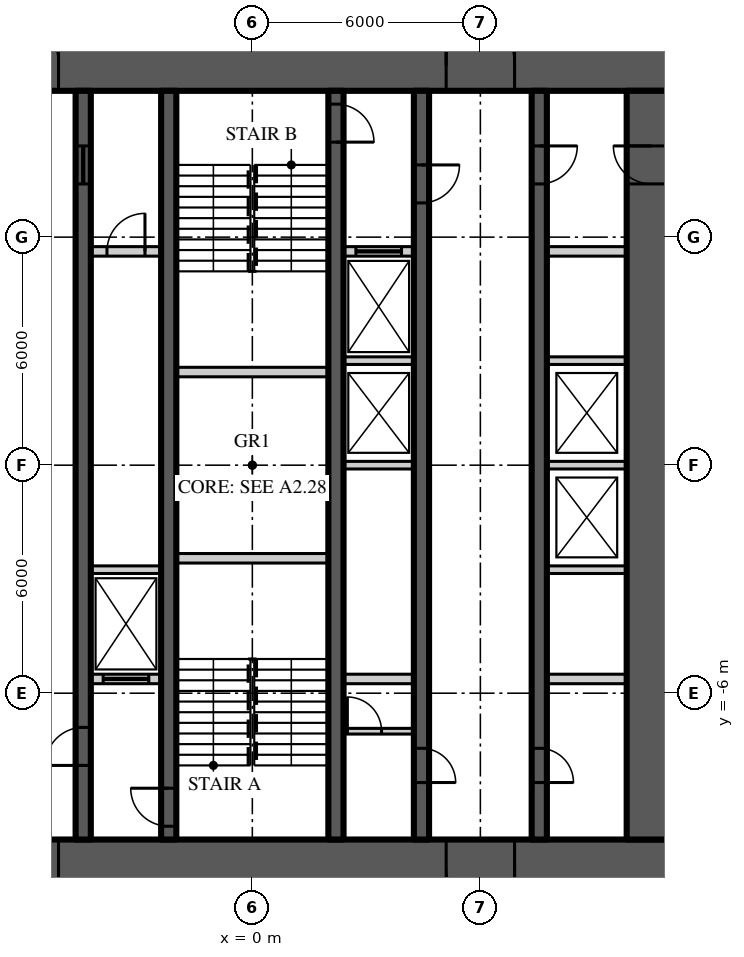
"""IFC4 building model, lengths in metres.
Left out: names, types, materials, properties, quantities, classifications, styles, units other than length and angle.
Written with IfcOpenShell. Run it as: python <this file> out.ifc"""

import sys

from ifc_helpers import new_model, si_unit, direction, frame, frame_2d, origin, place, context, subcontext, project, spatial, rectangle, extrude, element, fill, save


model = new_model("IFC4")
c1 = context("Model", 3, precision=1e-05, world=origin(), true_north=direction((0.0, 1.0)))
c2 = subcontext(c1, "Body", "Model", "MODEL_VIEW")
j1 = project(units=[si_unit("LENGTHUNIT", "METRE"), si_unit("PLANEANGLEUNIT", "RADIAN")], contexts=[c1])
p1 = place(None, origin())
s1 = spatial("IfcSite", under=j1, at=p1, CompositionType="ELEMENT")
p2 = place(p1, origin())
s2 = spatial("IfcBuilding", under=s1, at=p2, CompositionType="ELEMENT")
p3 = place(p2, frame((0.0, 0.0, 204.9)))
s3 = spatial("IfcBuildingStorey", under=s2, at=p3, CompositionType="ELEMENT", Elevation=204.9)
p4 = place(p3, frame((-11.15, 10.5, 0.0), z_axis=(0.0, 0.0, 1.0), x_axis=(1.0, 0.0, 0.0)))
e1 = element("IfcWall", 1, at=p4, inside=s3, PredefinedType="SHEAR", context=c2, shape_type="SweptSolid", body=[
    extrude(rectangle(XDim=22.3, YDim=1.3, at=frame_2d((11.15, 0.0))), origin(), (0.0, 0.0, 1.0), 3.9),
])
p5 = place(p4, frame((4.25, 0.0, 0.0)))
e2 = element("IfcOpeningElement", 2, at=p5, cuts=e1, PredefinedType="OPENING", context=c2, shape_type="SweptSolid", body=[
    extrude(rectangle(XDim=1.8, YDim=2.2, at=frame_2d((0.9, 1.1))), frame((0.0, 0.66, 0.0), z_axis=(0.0, -1.0, 0.0), x_axis=(1.0, 0.0, 0.0)), (0.0, 0.0, 1.0), 1.32),
])
p6 = place(p4, frame((16.25, 0.0, 0.0)))
e3 = element("IfcOpeningElement", 3, at=p6, cuts=e1, PredefinedType="OPENING", context=c2, shape_type="SweptSolid", body=[
    extrude(rectangle(XDim=1.8, YDim=2.2, at=frame_2d((0.9, 1.1))), frame((0.0, 0.66, 0.0), z_axis=(0.0, -1.0, 0.0), x_axis=(1.0, 0.0, 0.0)), (0.0, 0.0, 1.0), 1.32),
])
p7 = place(p3, frame((11.15, -10.5, 0.0), z_axis=(0.0, 0.0, 1.0), x_axis=(-1.0, 0.0, 0.0)))
e4 = element("IfcWall", 4, at=p7, inside=s3, PredefinedType="SHEAR", context=c2, shape_type="SweptSolid", body=[
    extrude(rectangle(XDim=22.3, YDim=1.3, at=frame_2d((11.15, 0.0))), origin(), (0.0, 0.0, 1.0), 3.9),
])
p8 = place(p7, frame((16.25, 0.0, 0.0)))
e5 = element("IfcOpeningElement", 5, at=p8, cuts=e4, PredefinedType="OPENING", context=c2, shape_type="SweptSolid", body=[
    extrude(rectangle(XDim=1.8, YDim=2.2, at=frame_2d((0.9, 1.1))), frame((0.0, 0.66, 0.0), z_axis=(0.0, -1.0, 0.0), x_axis=(1.0, 0.0, 0.0)), (0.0, 0.0, 1.0), 1.32),
])
p9 = place(p7, frame((4.25, 0.0, 0.0)))
e6 = element("IfcOpeningElement", 6, at=p9, cuts=e4, PredefinedType="OPENING", context=c2, shape_type="SweptSolid", body=[
    extrude(rectangle(XDim=1.8, YDim=2.2, at=frame_2d((0.9, 1.1))), frame((0.0, 0.66, 0.0), z_axis=(0.0, -1.0, 0.0), x_axis=(1.0, 0.0, 0.0)), (0.0, 0.0, 1.0), 1.32),
])
p10 = place(p3, frame((10.5, -9.85, 0.0), z_axis=(0.0, 0.0, 1.0), x_axis=(0.0, 1.0, 0.0)))
e7 = element("IfcWall", 7, at=p10, inside=s3, PredefinedType="SHEAR", context=c2, shape_type="SweptSolid", body=[
    extrude(rectangle(XDim=19.7, YDim=1.3, at=frame_2d((9.85, 0.0))), origin(), (0.0, 0.0, 1.0), 3.9),
])
p11 = place(p10, frame((17.25, 0.0, 0.0)))
e8 = element("IfcOpeningElement", 8, at=p11, cuts=e7, PredefinedType="OPENING", context=c2, shape_type="SweptSolid", body=[
    extrude(rectangle(XDim=1.0, YDim=2.2, at=frame_2d((0.5, 1.1))), frame((0.0, 0.66, 0.0), z_axis=(0.0, -1.0, 0.0), x_axis=(1.0, 0.0, 0.0)), (0.0, 0.0, 1.0), 1.32),
])
p12 = place(p3, frame((7.55, 9.85, 0.0), z_axis=(0.0, 0.0, 1.0), x_axis=(0.0, -1.0, 0.0)))
e9 = element("IfcWall", 9, at=p12, inside=s3, PredefinedType="SHEAR", context=c2, shape_type="SweptSolid", body=[
    extrude(rectangle(XDim=19.7, YDim=0.4, at=frame_2d((9.85, 0.0))), origin(), (0.0, 0.0, 1.0), 3.9),
])
p13 = place(p12, frame((1.45, 0.0, 0.0)))
e10 = element("IfcOpeningElement", 10, at=p13, cuts=e9, PredefinedType="OPENING", context=c2, shape_type="SweptSolid", body=[
    extrude(rectangle(XDim=1.0, YDim=2.2, at=frame_2d((0.5, 1.1))), frame((0.0, 0.21, 0.0), z_axis=(0.0, -1.0, 0.0), x_axis=(1.0, 0.0, 0.0)), (0.0, 0.0, 1.0), 0.42),
])
p14 = place(p12, frame((17.3, 0.0, 0.0)))
e11 = element("IfcOpeningElement", 11, at=p14, cuts=e9, PredefinedType="OPENING", context=c2, shape_type="SweptSolid", body=[
    extrude(rectangle(XDim=0.9, YDim=2.1, at=frame_2d((0.45, 1.05))), frame((0.0, 0.21, 0.0), z_axis=(0.0, -1.0, 0.0), x_axis=(1.0, 0.0, 0.0)), (0.0, 0.0, 1.0), 0.42),
])
p15 = place(p3, frame((-4.45, -9.85, 0.0), z_axis=(0.0, 0.0, 1.0), x_axis=(0.0, 1.0, 0.0)))
e12 = element("IfcWall", 12, at=p15, inside=s3, PredefinedType="SHEAR", context=c2, shape_type="SweptSolid", body=[
    extrude(rectangle(XDim=19.7, YDim=0.4, at=frame_2d((9.85, 0.0))), origin(), (0.0, 0.0, 1.0), 3.9),
])
p16 = place(p15, frame((1.95, 0.0, 0.0)))
e13 = element("IfcOpeningElement", 13, at=p16, cuts=e12, PredefinedType="OPENING", context=c2, shape_type="SweptSolid", body=[
    extrude(rectangle(XDim=1.0, YDim=2.2, at=frame_2d((0.5, 1.1))), frame((0.0, 0.21, 0.0), z_axis=(0.0, -1.0, 0.0), x_axis=(1.0, 0.0, 0.0)), (0.0, 0.0, 1.0), 0.42),
])
p17 = place(p15, frame((17.25, 0.0, 0.0)))
e14 = element("IfcOpeningElement", 14, at=p17, cuts=e12, PredefinedType="OPENING", context=c2, shape_type="SweptSolid", body=[
    extrude(rectangle(XDim=1.0, YDim=2.1, at=frame_2d((0.5, 1.05))), frame((0.0, 0.21, 0.0), z_axis=(0.0, -1.0, 0.0), x_axis=(1.0, 0.0, 0.0)), (0.0, 0.0, 1.0), 0.42),
])
p18 = place(p3, frame((4.45, 9.85, 0.0), z_axis=(0.0, 0.0, 1.0), x_axis=(0.0, -1.0, 0.0)))
e15 = element("IfcWall", 15, at=p18, inside=s3, PredefinedType="SHEAR", context=c2, shape_type="SweptSolid", body=[
    extrude(rectangle(XDim=19.7, YDim=0.4, at=frame_2d((9.85, 0.0))), origin(), (0.0, 0.0, 1.0), 3.9),
])
p19 = place(p18, frame((1.95, 0.0, 0.0)))
e16 = element("IfcOpeningElement", 16, at=p19, cuts=e15, PredefinedType="OPENING", context=c2, shape_type="SweptSolid", body=[
    extrude(rectangle(XDim=1.0, YDim=2.2, at=frame_2d((0.5, 1.1))), frame((0.0, 0.21, 0.0), z_axis=(0.0, -1.0, 0.0), x_axis=(1.0, 0.0, 0.0)), (0.0, 0.0, 1.0), 0.42),
])
p20 = place(p18, frame((17.3, 0.0, 0.0)))
e17 = element("IfcOpeningElement", 17, at=p20, cuts=e15, PredefinedType="OPENING", context=c2, shape_type="SweptSolid", body=[
    extrude(rectangle(XDim=0.9, YDim=2.1, at=frame_2d((0.45, 1.05))), frame((0.0, 0.21, 0.0), z_axis=(0.0, -1.0, 0.0), x_axis=(1.0, 0.0, 0.0)), (0.0, 0.0, 1.0), 0.42),
])
p21 = place(p3, frame((-2.2, -9.85, 0.0), z_axis=(0.0, 0.0, 1.0), x_axis=(0.0, 1.0, 0.0)))
e18 = element("IfcWall", 18, at=p21, inside=s3, PredefinedType="SHEAR", context=c2, shape_type="SweptSolid", body=[
    extrude(rectangle(XDim=19.7, YDim=0.4, at=frame_2d((9.85, 0.0))), origin(), (0.0, 0.0, 1.0), 3.9),
])
p22 = place(p21, frame((0.35, 0.0, 0.0)))
e19 = element("IfcOpeningElement", 19, at=p22, cuts=e18, PredefinedType="OPENING", context=c2, shape_type="SweptSolid", body=[
    extrude(rectangle(XDim=1.0, YDim=2.2, at=frame_2d((0.5, 1.1))), frame((0.0, 0.21, 0.0), z_axis=(0.0, -1.0, 0.0), x_axis=(1.0, 0.0, 0.0)), (0.0, 0.0, 1.0), 0.42),
])
p23 = place(p3, frame((2.2, 9.85, 0.0), z_axis=(0.0, 0.0, 1.0), x_axis=(0.0, -1.0, 0.0)))
e20 = element("IfcWall", 20, at=p23, inside=s3, PredefinedType="SHEAR", context=c2, shape_type="SweptSolid", body=[
    extrude(rectangle(XDim=19.7, YDim=0.4, at=frame_2d((9.85, 0.0))), origin(), (0.0, 0.0, 1.0), 3.9),
])
p24 = place(p23, frame((0.35, 0.0, 0.0)))
e21 = element("IfcOpeningElement", 21, at=p24, cuts=e20, PredefinedType="OPENING", context=c2, shape_type="SweptSolid", body=[
    extrude(rectangle(XDim=1.0, YDim=2.2, at=frame_2d((0.5, 1.1))), frame((0.0, 0.21, 0.0), z_axis=(0.0, -1.0, 0.0), x_axis=(1.0, 0.0, 0.0)), (0.0, 0.0, 1.0), 0.42),
])
p25 = place(p3, frame((-4.25, 5.625, 0.0), z_axis=(0.0, 0.0, 1.0), x_axis=(1.0, 0.0, 0.0)))
e22 = element("IfcWall", 22, at=p25, inside=s3, PredefinedType="SOLIDWALL", context=c2, shape_type="SweptSolid", body=[
    extrude(rectangle(XDim=1.85, YDim=0.25, at=frame_2d((0.925, 0.0))), origin(), (0.0, 0.0, 1.0), 3.7),
])
p26 = place(p25, frame((0.425, 0.0, 0.0)))
e23 = element("IfcOpeningElement", 23, at=p26, cuts=e22, PredefinedType="OPENING", context=c2, shape_type="SweptSolid", body=[
    extrude(rectangle(XDim=1.0, YDim=2.2, at=frame_2d((0.5, 1.1))), frame((0.0, 0.135, 0.0), z_axis=(0.0, -1.0, 0.0), x_axis=(1.0, 0.0, 0.0)), (0.0, 0.0, 1.0), 0.27),
])
p27 = place(p3, frame((2.4, 5.625, 0.0), z_axis=(0.0, 0.0, 1.0), x_axis=(1.0, 0.0, 0.0)))
e24 = element("IfcWall", 24, at=p27, inside=s3, PredefinedType="SOLIDWALL", context=c2, shape_type="SweptSolid", body=[
    extrude(rectangle(XDim=1.85, YDim=0.25, at=frame_2d((0.925, 0.0))), origin(), (0.0, 0.0, 1.0), 3.7),
])
p28 = place(p27, frame((0.325, 0.0, 0.0)))
e25 = element("IfcOpeningElement", 25, at=p28, cuts=e24, PredefinedType="OPENING", context=c2, shape_type="SweptSolid", body=[
    extrude(rectangle(XDim=1.2, YDim=2.2, at=frame_2d((0.6, 1.1))), frame((0.0, 0.135, 0.0), z_axis=(0.0, -1.0, 0.0), x_axis=(1.0, 0.0, 0.0)), (0.0, 0.0, 1.0), 0.27),
])
p29 = place(p3, frame((7.75, 5.625, 0.0), z_axis=(0.0, 0.0, 1.0), x_axis=(1.0, 0.0, 0.0)))
e26 = element("IfcWall", 26, at=p29, inside=s3, PredefinedType="SOLIDWALL", context=c2, shape_type="SweptSolid", body=[
    extrude(rectangle(XDim=2.1, YDim=0.25, at=frame_2d((1.05, 0.0))), origin(), (0.0, 0.0, 1.0), 3.7),
])
p30 = place(p3, frame((-4.25, -5.625, 0.0), z_axis=(0.0, 0.0, 1.0), x_axis=(1.0, 0.0, 0.0)))
e27 = element("IfcWall", 27, at=p30, inside=s3, PredefinedType="SOLIDWALL", context=c2, shape_type="SweptSolid", body=[
    extrude(rectangle(XDim=1.85, YDim=0.25, at=frame_2d((0.925, 0.0))), origin(), (0.0, 0.0, 1.0), 3.7),
])
p31 = place(p30, frame((0.325, 0.0, 0.0)))
e28 = element("IfcOpeningElement", 28, at=p31, cuts=e27, PredefinedType="OPENING", context=c2, shape_type="SweptSolid", body=[
    extrude(rectangle(XDim=1.2, YDim=2.2, at=frame_2d((0.6, 1.1))), frame((0.0, 0.135, 0.0), z_axis=(0.0, -1.0, 0.0), x_axis=(1.0, 0.0, 0.0)), (0.0, 0.0, 1.0), 0.27),
])
p32 = place(p3, frame((2.4, -5.625, 0.0), z_axis=(0.0, 0.0, 1.0), x_axis=(1.0, 0.0, 0.0)))
e29 = element("IfcWall", 29, at=p32, inside=s3, PredefinedType="SOLIDWALL", context=c2, shape_type="SweptSolid", body=[
    extrude(rectangle(XDim=1.85, YDim=0.25, at=frame_2d((0.925, 0.0))), origin(), (0.0, 0.0, 1.0), 3.7),
])
p33 = place(p3, frame((7.75, -5.625, 0.0), z_axis=(0.0, 0.0, 1.0), x_axis=(1.0, 0.0, 0.0)))
e30 = element("IfcWall", 30, at=p33, inside=s3, PredefinedType="SOLIDWALL", context=c2, shape_type="SweptSolid", body=[
    extrude(rectangle(XDim=2.1, YDim=0.25, at=frame_2d((1.05, 0.0))), origin(), (0.0, 0.0, 1.0), 3.7),
])
for number, where, z_axis, x_axis in (
    (31, (-2.0, -2.45, 0.0), (0.0, 0.0, 1.0), (1.0, 0.0, 0.0)),
    (32, (-2.0, 2.45, 0.0), (0.0, 0.0, 1.0), (1.0, 0.0, 0.0)),
):
    element("IfcWall", number, at=place(p3, frame(where, z_axis=z_axis, x_axis=x_axis)), inside=s3, PredefinedType="SOLIDWALL", context=c2, shape_type="SweptSolid", body=[
        extrude(rectangle(XDim=4.0, YDim=0.25, at=frame_2d((2.0, 0.0))), origin(), (0.0, 0.0, 1.0), 3.7),
    ])
p34 = place(p3, frame((-4.25, -2.75, 0.0), z_axis=(0.0, 0.0, 1.0), x_axis=(1.0, 0.0, 0.0)))
e33 = element("IfcWall", 33, at=p34, inside=s3, PredefinedType="SOLIDWALL", context=c2, shape_type="SweptSolid", body=[
    extrude(rectangle(XDim=1.85, YDim=0.2, at=frame_2d((0.925, 0.0))), origin(), (0.0, 0.0, 1.0), 3.7),
])
p35 = place(p3, frame((7.75, -2.75, 0.0), z_axis=(0.0, 0.0, 1.0), x_axis=(1.0, 0.0, 0.0)))
e34 = element("IfcWall", 34, at=p35, inside=s3, PredefinedType="SOLIDWALL", context=c2, shape_type="SweptSolid", body=[
    extrude(rectangle(XDim=2.1, YDim=0.2, at=frame_2d((1.05, 0.0))), origin(), (0.0, 0.0, 1.0), 3.7),
])
p36 = place(p3, frame((2.4, 0.0, 0.0), z_axis=(0.0, 0.0, 1.0), x_axis=(1.0, 0.0, 0.0)))
e35 = element("IfcWall", 35, at=p36, inside=s3, PredefinedType="SOLIDWALL", context=c2, shape_type="SweptSolid", body=[
    extrude(rectangle(XDim=1.85, YDim=0.2, at=frame_2d((0.925, 0.0))), origin(), (0.0, 0.0, 1.0), 3.7),
])
p37 = place(p3, frame((7.75, 0.0, 0.0), z_axis=(0.0, 0.0, 1.0), x_axis=(1.0, 0.0, 0.0)))
e36 = element("IfcWall", 36, at=p37, inside=s3, PredefinedType="SOLIDWALL", context=c2, shape_type="SweptSolid", body=[
    extrude(rectangle(XDim=2.1, YDim=0.2, at=frame_2d((1.05, 0.0))), origin(), (0.0, 0.0, 1.0), 3.7),
])
p38 = place(p3, frame((2.4, 2.75, 0.0), z_axis=(0.0, 0.0, 1.0), x_axis=(1.0, 0.0, 0.0)))
e37 = element("IfcWall", 37, at=p38, inside=s3, PredefinedType="SOLIDWALL", context=c2, shape_type="SweptSolid", body=[
    extrude(rectangle(XDim=1.85, YDim=0.2, at=frame_2d((0.925, 0.0))), origin(), (0.0, 0.0, 1.0), 3.7),
])
p39 = place(p3, frame((7.75, 2.75, 0.0), z_axis=(0.0, 0.0, 1.0), x_axis=(1.0, 0.0, 0.0)))
e38 = element("IfcWall", 38, at=p39, inside=s3, PredefinedType="SOLIDWALL", context=c2, shape_type="SweptSolid", body=[
    extrude(rectangle(XDim=2.1, YDim=0.2, at=frame_2d((1.05, 0.0))), origin(), (0.0, 0.0, 1.0), 3.7),
])
p40 = place(p3, frame((2.4, -7.0, 0.0), z_axis=(0.0, 0.0, 1.0), x_axis=(1.0, 0.0, 0.0)))
e39 = element("IfcWall", 39, at=p40, inside=s3, PredefinedType="SOLIDWALL", context=c2, shape_type="SweptSolid", body=[
    extrude(rectangle(XDim=1.85, YDim=0.15, at=frame_2d((0.925, 0.0))), origin(), (0.0, 0.0, 1.0), 3.77),
])
p41 = place(p40, frame((0.1, 0.0, 0.0)))
e40 = element("IfcOpeningElement", 40, at=p41, cuts=e39, PredefinedType="OPENING", context=c2, shape_type="SweptSolid", body=[
    extrude(rectangle(XDim=0.9, YDim=2.1, at=frame_2d((0.45, 1.05))), frame((0.0, 0.085, 0.0), z_axis=(0.0, -1.0, 0.0), x_axis=(1.0, 0.0, 0.0)), (0.0, 0.0, 1.0), 0.17),
])
p42 = place(p5, origin())
e41 = element("IfcDoor", 41, at=p42, inside=s3, OperationType="DOUBLE_DOOR_DOUBLE_SWING", PredefinedType="DOOR", context=c2, shape_type="SweptSolid", body=[
    extrude(rectangle(XDim=1.8, YDim=2.2, at=frame_2d((0.9, 1.1))), frame((0.0, 0.025, 0.0), z_axis=(0.0, -1.0, 0.0), x_axis=(1.0, 0.0, 0.0)), (0.0, 0.0, 1.0), 0.05),
])
fill(e2, e41)
p43 = place(p8, origin())
e42 = element("IfcDoor", 42, at=p43, inside=s3, OperationType="DOUBLE_DOOR_DOUBLE_SWING", PredefinedType="DOOR", context=c2, shape_type="SweptSolid", body=[
    extrude(rectangle(XDim=1.8, YDim=2.2, at=frame_2d((0.9, 1.1))), frame((0.0, 0.025, 0.0), z_axis=(0.0, -1.0, 0.0), x_axis=(1.0, 0.0, 0.0)), (0.0, 0.0, 1.0), 0.05),
])
fill(e5, e42)
p44 = place(p6, origin())
e43 = element("IfcDoor", 43, at=p44, inside=s3, OperationType="DOUBLE_DOOR_DOUBLE_SWING", PredefinedType="DOOR", context=c2, shape_type="SweptSolid", body=[
    extrude(rectangle(XDim=1.8, YDim=2.2, at=frame_2d((0.9, 1.1))), frame((0.0, 0.025, 0.0), z_axis=(0.0, -1.0, 0.0), x_axis=(1.0, 0.0, 0.0)), (0.0, 0.0, 1.0), 0.05),
])
fill(e3, e43)
p45 = place(p9, origin())
e44 = element("IfcDoor", 44, at=p45, inside=s3, OperationType="DOUBLE_DOOR_DOUBLE_SWING", PredefinedType="DOOR", context=c2, shape_type="SweptSolid", body=[
    extrude(rectangle(XDim=1.8, YDim=2.2, at=frame_2d((0.9, 1.1))), frame((0.0, 0.025, 0.0), z_axis=(0.0, -1.0, 0.0), x_axis=(1.0, 0.0, 0.0)), (0.0, 0.0, 1.0), 0.05),
])
fill(e6, e44)
p46 = place(p13, origin())
e45 = element("IfcDoor", 45, at=p46, inside=s3, OperationType="SINGLE_SWING_LEFT", PredefinedType="DOOR", context=c2, shape_type="SweptSolid", body=[
    extrude(rectangle(XDim=1.0, YDim=2.2, at=frame_2d((0.5, 1.1))), frame((0.0, 0.025, 0.0), z_axis=(0.0, -1.0, 0.0), x_axis=(1.0, 0.0, 0.0)), (0.0, 0.0, 1.0), 0.05),
])
fill(e10, e45)
p47 = place(p11, origin())
e46 = element("IfcDoor", 46, at=p47, inside=s3, OperationType="SINGLE_SWING_RIGHT", PredefinedType="DOOR", context=c2, shape_type="SweptSolid", body=[
    extrude(rectangle(XDim=1.0, YDim=2.2, at=frame_2d((0.5, 1.1))), frame((0.0, 0.025, 0.0), z_axis=(0.0, -1.0, 0.0), x_axis=(1.0, 0.0, 0.0)), (0.0, 0.0, 1.0), 0.05),
])
fill(e8, e46)
p48 = place(p16, origin())
e47 = element("IfcDoor", 47, at=p48, inside=s3, OperationType="SINGLE_SWING_LEFT", PredefinedType="DOOR", context=c2, shape_type="SweptSolid", body=[
    extrude(rectangle(XDim=1.0, YDim=2.2, at=frame_2d((0.5, 1.1))), frame((0.0, 0.025, 0.0), z_axis=(0.0, -1.0, 0.0), x_axis=(1.0, 0.0, 0.0)), (0.0, 0.0, 1.0), 0.05),
])
fill(e13, e47)
p49 = place(p22, origin())
e48 = element("IfcDoor", 48, at=p49, inside=s3, OperationType="SINGLE_SWING_RIGHT", PredefinedType="DOOR", context=c2, shape_type="SweptSolid", body=[
    extrude(rectangle(XDim=1.0, YDim=2.2, at=frame_2d((0.5, 1.1))), frame((0.0, 0.025, 0.0), z_axis=(0.0, -1.0, 0.0), x_axis=(1.0, 0.0, 0.0)), (0.0, 0.0, 1.0), 0.05),
])
fill(e19, e48)
p50 = place(p19, origin())
e49 = element("IfcDoor", 49, at=p50, inside=s3, OperationType="SINGLE_SWING_LEFT", PredefinedType="DOOR", context=c2, shape_type="SweptSolid", body=[
    extrude(rectangle(XDim=1.0, YDim=2.2, at=frame_2d((0.5, 1.1))), frame((0.0, 0.025, 0.0), z_axis=(0.0, -1.0, 0.0), x_axis=(1.0, 0.0, 0.0)), (0.0, 0.0, 1.0), 0.05),
])
fill(e16, e49)
p51 = place(p24, origin())
e50 = element("IfcDoor", 50, at=p51, inside=s3, OperationType="SINGLE_SWING_RIGHT", PredefinedType="DOOR", context=c2, shape_type="SweptSolid", body=[
    extrude(rectangle(XDim=1.0, YDim=2.2, at=frame_2d((0.5, 1.1))), frame((0.0, 0.025, 0.0), z_axis=(0.0, -1.0, 0.0), x_axis=(1.0, 0.0, 0.0)), (0.0, 0.0, 1.0), 0.05),
])
fill(e21, e50)
p52 = place(p17, origin())
e51 = element("IfcDoor", 51, at=p52, inside=s3, OperationType="SLIDING_TO_LEFT", PredefinedType="DOOR", context=c2, shape_type="SweptSolid", body=[
    extrude(rectangle(XDim=1.0, YDim=2.1, at=frame_2d((0.5, 1.05))), frame((0.0, 0.025, 0.0), z_axis=(0.0, -1.0, 0.0), x_axis=(1.0, 0.0, 0.0)), (0.0, 0.0, 1.0), 0.05),
])
fill(e14, e51)
p53 = place(p14, origin())
e52 = element("IfcDoor", 52, at=p53, inside=s3, OperationType="SINGLE_SWING_RIGHT", PredefinedType="DOOR", context=c2, shape_type="SweptSolid", body=[
    extrude(rectangle(XDim=0.9, YDim=2.1, at=frame_2d((0.45, 1.05))), frame((0.0, 0.025, 0.0), z_axis=(0.0, -1.0, 0.0), x_axis=(1.0, 0.0, 0.0)), (0.0, 0.0, 1.0), 0.05),
])
fill(e11, e52)
p54 = place(p20, origin())
e53 = element("IfcDoor", 53, at=p54, inside=s3, OperationType="SINGLE_SWING_RIGHT", PredefinedType="DOOR", context=c2, shape_type="SweptSolid", body=[
    extrude(rectangle(XDim=0.9, YDim=2.1, at=frame_2d((0.45, 1.05))), frame((0.0, 0.025, 0.0), z_axis=(0.0, -1.0, 0.0), x_axis=(1.0, 0.0, 0.0)), (0.0, 0.0, 1.0), 0.05),
])
fill(e17, e53)
p55 = place(p31, origin())
e54 = element("IfcDoor", 54, at=p55, inside=s3, OperationType="SLIDING_TO_LEFT", PredefinedType="DOOR", context=c2, shape_type="SweptSolid", body=[
    extrude(rectangle(XDim=1.2, YDim=2.2, at=frame_2d((0.6, 1.1))), frame((0.0, 0.025, 0.0), z_axis=(0.0, -1.0, 0.0), x_axis=(1.0, 0.0, 0.0)), (0.0, 0.0, 1.0), 0.05),
])
fill(e28, e54)
p56 = place(p28, origin())
e55 = element("IfcDoor", 55, at=p56, inside=s3, OperationType="SLIDING_TO_LEFT", PredefinedType="DOOR", context=c2, shape_type="SweptSolid", body=[
    extrude(rectangle(XDim=1.2, YDim=2.2, at=frame_2d((0.6, 1.1))), frame((0.0, 0.025, 0.0), z_axis=(0.0, -1.0, 0.0), x_axis=(1.0, 0.0, 0.0)), (0.0, 0.0, 1.0), 0.05),
])
fill(e25, e55)
p57 = place(p26, origin())
e56 = element("IfcDoor", 56, at=p57, inside=s3, OperationType="SINGLE_SWING_RIGHT", PredefinedType="DOOR", context=c2, shape_type="SweptSolid", body=[
    extrude(rectangle(XDim=1.0, YDim=2.2, at=frame_2d((0.5, 1.1))), frame((0.0, 0.025, 0.0), z_axis=(0.0, -1.0, 0.0), x_axis=(1.0, 0.0, 0.0)), (0.0, 0.0, 1.0), 0.05),
])
fill(e23, e56)
p58 = place(p41, origin())
e57 = element("IfcDoor", 57, at=p58, inside=s3, OperationType="SINGLE_SWING_LEFT", PredefinedType="DOOR", context=c2, shape_type="SweptSolid", body=[
    extrude(rectangle(XDim=0.9, YDim=2.1, at=frame_2d((0.45, 1.05))), frame((0.0, 0.025, 0.0), z_axis=(0.0, -1.0, 0.0), x_axis=(1.0, 0.0, 0.0)), (0.0, 0.0, 1.0), 0.05),
])
fill(e40, e57)
save(model, sys.argv[1])
